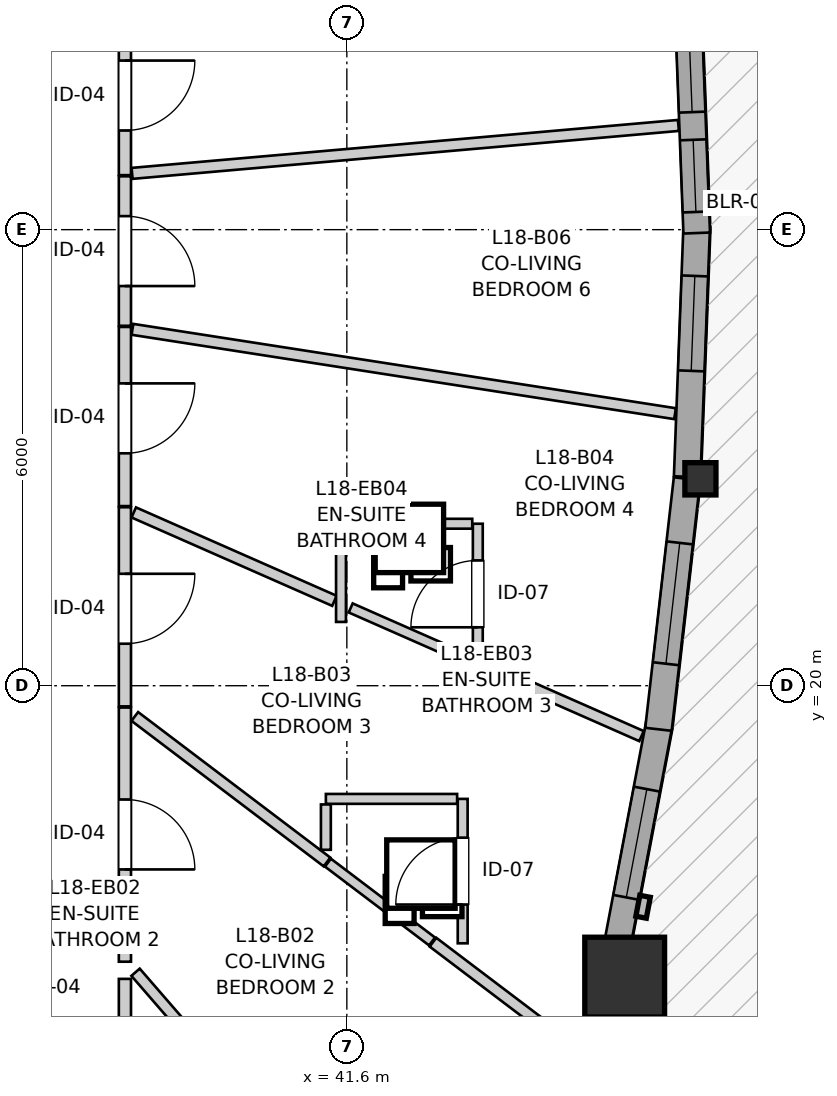
"""IFC4 building model, lengths in metres.
Left out: names, types, materials, properties, quantities, classifications, styles, units other than length and angle.
Written with IfcOpenShell. Run it as: python <this file> out.ifc"""

import sys

from ifc_helpers import new_model, si_unit, direction, frame, frame_2d, origin, origin_2d, place, context, subcontext, project, spatial, rectangle, i_section, extrude, source, transform, mapped, element, fill, save


model = new_model("IFC4")
c1 = context("Model", 3, precision=1e-05, world=origin(), true_north=direction((0.0, 1.0)))
c2 = subcontext(c1, "Body", "Model", "MODEL_VIEW")
j1 = project(units=[si_unit("LENGTHUNIT", "METRE"), si_unit("PLANEANGLEUNIT", "RADIAN")], contexts=[c1])
p1 = place(None, origin())
s1 = spatial("IfcSite", under=j1, at=p1, CompositionType="ELEMENT")
p2 = place(p1, origin())
s2 = spatial("IfcBuilding", under=s1, at=p2, CompositionType="ELEMENT")
p3 = place(p2, frame((0.0, 0.0, 62.2)))
s3 = spatial("IfcBuildingStorey", under=s2, at=p3, CompositionType="ELEMENT", Elevation=62.2)
m1 = source(origin(), c2, "Body", "SweptSolid", [
    extrude(rectangle(XDim=1.05, YDim=1.05, at=origin_2d()), origin(), (0.0, 0.0, 1.0), 2.9),
])
p4 = place(p3, frame((45.256, 16.166, 0.0), z_axis=(0.0, 0.0, 1.0), x_axis=(1.0, 0.0, 0.0)))
e1 = element("IfcColumn", 1, at=p4, inside=s3, PredefinedType="COLUMN", context=c2, shape_type="MappedRepresentation", body=[
    mapped(m1, transform((0.0, 0.0, 0.0), x_axis=(1.0, 0.0, 0.0), y_axis=(0.0, 1.0, 0.0), z_axis=(0.0, 0.0, 1.0), scale=1.0)),
])
m2 = source(origin(), c2, "Body", "SweptSolid", [
    extrude(i_section(OverallWidth=0.409, OverallDepth=0.425, WebThickness=0.03, FlangeThickness=0.048, FilletRadius=0.015, at=origin_2d()), origin(), (0.0, 0.0, 1.0), 2.9),
])
p5 = place(p3, frame((46.252, 22.722, 0.0), z_axis=(0.0, 0.0, 1.0), x_axis=(1.0, 0.0, 0.0)))
e2 = element("IfcColumn", 2, at=p5, inside=s3, PredefinedType="PILASTER", context=c2, shape_type="MappedRepresentation", body=[
    mapped(m2, transform((0.0, 0.0, 0.0), x_axis=(1.0, 0.0, 0.0), y_axis=(0.0, 1.0, 0.0), z_axis=(0.0, 0.0, 1.0), scale=1.0)),
])
p6 = place(p3, frame((44.205, 12.897, 0.0), z_axis=(0.0, 0.0, 1.0), x_axis=(0.257099428233, 0.966384956424, 0.0)))
e3 = element("IfcWall", 3, at=p6, inside=s3, PredefinedType="SOLIDWALL", context=c2, shape_type="SweptSolid", body=[
    extrude(rectangle(XDim=3.13, YDim=0.35, at=frame_2d((1.565, 0.0))), origin(), (0.0, 0.0, 1.0), 2.38),
])
p7 = place(p6, frame((0.595, 0.0, 0.0)))
e4 = element("IfcOpeningElement", 4, at=p7, cuts=e3, PredefinedType="OPENING", context=c2, shape_type="SweptSolid", body=[
    extrude(rectangle(XDim=1.0, YDim=2.1, at=frame_2d((0.5, 1.05))), frame((0.0, 0.185, 0.0), z_axis=(0.0, -1.0, 0.0), x_axis=(1.0, 0.0, 0.0)), (0.0, 0.0, 1.0), 0.37),
])
p8 = place(p3, frame((45.14, 16.494, 0.0), z_axis=(0.0, 0.0, 1.0), x_axis=(0.186608529586, 0.982434352354, 0.0)))
e5 = element("IfcWall", 5, at=p8, inside=s3, PredefinedType="SOLIDWALL", context=c2, shape_type="SweptSolid", body=[
    extrude(rectangle(XDim=3.074, YDim=0.35, at=frame_2d((1.537, 0.0))), origin(), (0.0, 0.0, 1.0), 2.38),
])
p9 = place(p8, frame((0.734, 0.0, 0.82)))
e6 = element("IfcOpeningElement", 6, at=p9, cuts=e5, PredefinedType="OPENING", context=c2, shape_type="SweptSolid", body=[
    extrude(rectangle(XDim=1.45, YDim=1.25, at=frame_2d((0.725, 0.625))), frame((0.0, 0.185, 0.0), z_axis=(0.0, -1.0, 0.0), x_axis=(1.0, 0.0, 0.0)), (0.0, 0.0, 1.0), 0.37),
])
p10 = place(p3, frame((45.7, 19.426, 0.0), z_axis=(0.0, 0.0, 1.0), x_axis=(0.113266370988, 0.993564657787, 0.0)))
e7 = element("IfcWall", 7, at=p10, inside=s3, PredefinedType="SOLIDWALL", context=c2, shape_type="SweptSolid", body=[
    extrude(rectangle(XDim=3.317, YDim=0.35, at=frame_2d((1.659, 0.0))), origin(), (0.0, 0.0, 1.0), 2.38),
])
p11 = place(p10, frame((0.869, 0.0, 0.82)))
e8 = element("IfcOpeningElement", 8, at=p11, cuts=e7, PredefinedType="OPENING", context=c2, shape_type="SweptSolid", body=[
    extrude(rectangle(XDim=1.6, YDim=1.35, at=frame_2d((0.8, 0.675))), frame((0.0, 0.185, 0.0), z_axis=(0.0, -1.0, 0.0), x_axis=(1.0, 0.0, 0.0)), (0.0, 0.0, 1.0), 0.37),
])
p12 = place(p3, frame((46.078, 22.749, 0.0), z_axis=(0.0, 0.0, 1.0), x_axis=(0.037972593677, 0.999278780986, 0.0)))
e9 = element("IfcWall", 9, at=p12, inside=s3, PredefinedType="SOLIDWALL", context=c2, shape_type="SweptSolid", body=[
    extrude(rectangle(XDim=3.298, YDim=0.35, at=frame_2d((1.649, 0.0))), origin(), (0.0, 0.0, 1.0), 2.38),
])
p13 = place(p12, frame((1.394, 0.0, 0.82)))
e10 = element("IfcOpeningElement", 10, at=p13, cuts=e9, PredefinedType="OPENING", context=c2, shape_type="SweptSolid", body=[
    extrude(rectangle(XDim=1.25, YDim=1.35, at=frame_2d((0.625, 0.675))), frame((0.0, 0.185, 0.0), z_axis=(0.0, -1.0, 0.0), x_axis=(1.0, 0.0, 0.0)), (0.0, 0.0, 1.0), 0.37),
])
p14 = place(p3, frame((46.203, 25.955, 0.0), z_axis=(0.0, 0.0, 1.0), x_axis=(-0.038016855762, 0.999277098045, 0.0)))
e11 = element("IfcWall", 11, at=p14, inside=s3, PredefinedType="SOLIDWALL", context=c2, shape_type="SweptSolid", body=[
    extrude(rectangle(XDim=3.018, YDim=0.35, at=frame_2d((1.509, 0.0))), origin(), (0.0, 0.0, 1.0), 2.38),
])
p15 = place(p14, frame((0.277, 0.0, 0.82)))
e12 = element("IfcOpeningElement", 12, at=p15, cuts=e11, PredefinedType="OPENING", context=c2, shape_type="SweptSolid", body=[
    extrude(rectangle(XDim=0.95, YDim=1.35, at=frame_2d((0.475, 0.675))), frame((0.0, 0.185, 0.0), z_axis=(0.0, -1.0, 0.0), x_axis=(1.0, 0.0, 0.0)), (0.0, 0.0, 1.0), 0.37),
])
p16 = place(p14, frame((1.592, 0.0, 0.82)))
e13 = element("IfcOpeningElement", 13, at=p16, cuts=e11, PredefinedType="OPENING", context=c2, shape_type="SweptSolid", body=[
    extrude(rectangle(XDim=0.95, YDim=1.35, at=frame_2d((0.475, 0.675))), frame((0.0, 0.185, 0.0), z_axis=(0.0, -1.0, 0.0), x_axis=(1.0, 0.0, 0.0)), (0.0, 0.0, 1.0), 0.37),
])
p17 = place(p3, frame((38.68, 19.713, 0.0), z_axis=(0.0, 0.0, 1.0), x_axis=(0.0, -1.0, 0.0)))
e14 = element("IfcWall", 14, at=p17, inside=s3, PredefinedType="PARTITIONING", context=c2, shape_type="SweptSolid", body=[
    extrude(rectangle(XDim=3.344, YDim=0.16, at=frame_2d((1.672, 0.0))), origin(), (0.0, 0.0, 1.0), 2.9),
])
p18 = place(p17, frame((1.21, 0.0, 0.0)))
e15 = element("IfcOpeningElement", 15, at=p18, cuts=e14, PredefinedType="OPENING", context=c2, shape_type="SweptSolid", body=[
    extrude(rectangle(XDim=0.92, YDim=2.1, at=frame_2d((0.46, 1.05))), frame((0.0, 0.09, 0.0), z_axis=(0.0, -1.0, 0.0), x_axis=(1.0, 0.0, 0.0)), (0.0, 0.0, 1.0), 0.18),
])
p19 = place(p3, frame((38.68, 22.348, 0.0), z_axis=(0.0, 0.0, 1.0), x_axis=(0.0, -1.0, 0.0)))
e16 = element("IfcWall", 16, at=p19, inside=s3, PredefinedType="PARTITIONING", context=c2, shape_type="SweptSolid", body=[
    extrude(rectangle(XDim=2.62, YDim=0.16, at=frame_2d((1.31, 0.0))), origin(), (0.0, 0.0, 1.0), 2.9),
])
p20 = place(p19, frame((0.875, 0.0, 0.0)))
e17 = element("IfcOpeningElement", 17, at=p20, cuts=e16, PredefinedType="OPENING", context=c2, shape_type="SweptSolid", body=[
    extrude(rectangle(XDim=0.92, YDim=2.1, at=frame_2d((0.46, 1.05))), frame((0.0, 0.09, 0.0), z_axis=(0.0, -1.0, 0.0), x_axis=(1.0, 0.0, 0.0)), (0.0, 0.0, 1.0), 0.18),
])
p21 = place(p3, frame((38.68, 24.72, 0.0), z_axis=(0.0, 0.0, 1.0), x_axis=(0.0, -1.0, 0.0)))
e18 = element("IfcWall", 18, at=p21, inside=s3, PredefinedType="PARTITIONING", context=c2, shape_type="SweptSolid", body=[
    extrude(rectangle(XDim=2.357, YDim=0.16, at=frame_2d((1.178, 0.0))), origin(), (0.0, 0.0, 1.0), 2.9),
])
p22 = place(p21, frame((0.742, 0.0, 0.0)))
e19 = element("IfcOpeningElement", 19, at=p22, cuts=e18, PredefinedType="OPENING", context=c2, shape_type="SweptSolid", body=[
    extrude(rectangle(XDim=0.92, YDim=2.1, at=frame_2d((0.46, 1.05))), frame((0.0, 0.09, 0.0), z_axis=(0.0, -1.0, 0.0), x_axis=(1.0, 0.0, 0.0)), (0.0, 0.0, 1.0), 0.18),
])
p23 = place(p3, frame((38.68, 28.766, 0.0), z_axis=(0.0, 0.0, 1.0), x_axis=(0.0, -1.0, 0.0)))
e20 = element("IfcWall", 20, at=p23, inside=s3, PredefinedType="PARTITIONING", context=c2, shape_type="SweptSolid", body=[
    extrude(rectangle(XDim=2.049, YDim=0.16, at=frame_2d((1.024, 0.0))), origin(), (0.0, 0.0, 1.0), 2.9),
])
p24 = place(p23, frame((0.542, 0.0, 0.0)))
e21 = element("IfcOpeningElement", 21, at=p24, cuts=e20, PredefinedType="OPENING", context=c2, shape_type="SweptSolid", body=[
    extrude(rectangle(XDim=0.92, YDim=2.1, at=frame_2d((0.46, 1.05))), frame((0.0, 0.09, 0.0), z_axis=(0.0, -1.0, 0.0), x_axis=(1.0, 0.0, 0.0)), (0.0, 0.0, 1.0), 0.18),
])
p25 = place(p3, frame((38.68, 26.702, 0.0), z_axis=(0.0, 0.0, 1.0), x_axis=(0.0, -1.0, 0.0)))
e22 = element("IfcWall", 22, at=p25, inside=s3, PredefinedType="PARTITIONING", context=c2, shape_type="SweptSolid", body=[
    extrude(rectangle(XDim=1.967, YDim=0.16, at=frame_2d((0.983, 0.0))), origin(), (0.0, 0.0, 1.0), 2.9),
])
p26 = place(p25, frame((0.524, 0.0, 0.0)))
e23 = element("IfcOpeningElement", 23, at=p26, cuts=e22, PredefinedType="OPENING", context=c2, shape_type="SweptSolid", body=[
    extrude(rectangle(XDim=0.92, YDim=2.1, at=frame_2d((0.46, 1.05))), frame((0.0, 0.09, 0.0), z_axis=(0.0, -1.0, 0.0), x_axis=(1.0, 0.0, 0.0)), (0.0, 0.0, 1.0), 0.18),
])
p27 = place(p3, frame((43.124, 16.611, 0.0), z_axis=(0.0, 0.0, 1.0), x_axis=(0.0, 1.0, 0.0)))
e24 = element("IfcWall", 24, at=p27, inside=s3, PredefinedType="PARTITIONING", context=c2, shape_type="SweptSolid", body=[
    extrude(rectangle(XDim=1.9, YDim=0.13, at=frame_2d((0.95, 0.0))), origin(), (0.0, 0.0, 1.0), 2.9),
])
p28 = place(p27, frame((0.51, 0.0, 0.0)))
e25 = element("IfcOpeningElement", 25, at=p28, cuts=e24, PredefinedType="OPENING", context=c2, shape_type="SweptSolid", body=[
    extrude(rectangle(XDim=0.88, YDim=2.05, at=frame_2d((0.44, 1.025))), frame((0.0, 0.075, 0.0), z_axis=(0.0, -1.0, 0.0), x_axis=(1.0, 0.0, 0.0)), (0.0, 0.0, 1.0), 0.15),
])
p29 = place(p3, frame((43.323, 20.286, 0.0), z_axis=(0.0, 0.0, 1.0), x_axis=(0.0, 1.0, 0.0)))
e26 = element("IfcWall", 26, at=p29, inside=s3, PredefinedType="PARTITIONING", context=c2, shape_type="SweptSolid", body=[
    extrude(rectangle(XDim=1.845, YDim=0.13, at=frame_2d((0.923, 0.0))), origin(), (0.0, 0.0, 1.0), 2.9),
])
p30 = place(p29, frame((0.482, 0.0, 0.0)))
e27 = element("IfcOpeningElement", 27, at=p30, cuts=e26, PredefinedType="OPENING", context=c2, shape_type="SweptSolid", body=[
    extrude(rectangle(XDim=0.88, YDim=2.05, at=frame_2d((0.44, 1.025))), frame((0.0, 0.075, 0.0), z_axis=(0.0, -1.0, 0.0), x_axis=(1.0, 0.0, 0.0)), (0.0, 0.0, 1.0), 0.15),
])
p31 = place(p3, frame((38.779, 24.689, 0.0), z_axis=(0.0, 0.0, 1.0), x_axis=(0.988134938683, -0.153588225311, 0.0)))
e28 = element("IfcWall", 28, at=p31, inside=s3, PredefinedType="PARTITIONING", context=c2, shape_type="SweptSolid", body=[
    extrude(rectangle(XDim=7.225, YDim=0.145, at=frame_2d((3.612, 0.0))), origin(), (0.0, 0.0, 1.0), 2.9),
])
p32 = place(p3, frame((38.774, 26.74, 0.0), z_axis=(0.0, 0.0, 1.0), x_axis=(0.99617095107, 0.087426747871, 0.0)))
e29 = element("IfcWall", 29, at=p32, inside=s3, PredefinedType="PARTITIONING", context=c2, shape_type="SweptSolid", body=[
    extrude(rectangle(XDim=7.216, YDim=0.145, at=frame_2d((3.608, 0.0))), origin(), (0.0, 0.0, 1.0), 2.9),
])
p33 = place(p3, frame((38.81, 19.595, 0.0), z_axis=(0.0, 0.0, 1.0), x_axis=(0.797304275437, -0.603577577756, 0.0)))
e30 = element("IfcWall", 30, at=p33, inside=s3, PredefinedType="PARTITIONING", context=c2, shape_type="SweptSolid", body=[
    extrude(rectangle(XDim=3.172, YDim=0.145, at=frame_2d((1.586, 0.0))), origin(), (0.0, 0.0, 1.0), 2.9),
])
p34 = place(p3, frame((38.796, 22.28, 0.0), z_axis=(0.0, 0.0, 1.0), x_axis=(0.9151327572, -0.403152622092, 0.0)))
e31 = element("IfcWall", 31, at=p34, inside=s3, PredefinedType="PARTITIONING", context=c2, shape_type="SweptSolid", body=[
    extrude(rectangle(XDim=2.885, YDim=0.145, at=frame_2d((1.442, 0.0))), origin(), (0.0, 0.0, 1.0), 2.9),
])
p35 = place(p3, frame((38.82, 16.23, 0.0), z_axis=(0.0, 0.0, 1.0), x_axis=(0.655037088123, -0.755596726556, 0.0)))
e32 = element("IfcWall", 32, at=p35, inside=s3, PredefinedType="PARTITIONING", context=c2, shape_type="SweptSolid", body=[
    extrude(rectangle(XDim=2.442, YDim=0.145, at=frame_2d((1.221, 0.0))), origin(), (0.0, 0.0, 1.0), 2.9),
])
p36 = place(p3, frame((43.41, 20.248, 0.0), z_axis=(0.0, 0.0, 1.0), x_axis=(0.915032786041, -0.403379474527, 0.0)))
e33 = element("IfcWall", 33, at=p36, inside=s3, PredefinedType="PARTITIONING", context=c2, shape_type="SweptSolid", body=[
    extrude(rectangle(XDim=2.259, YDim=0.145, at=frame_2d((1.13, 0.0))), origin(), (0.0, 0.0, 1.0), 2.9),
])
p37 = place(p3, frame((42.733, 16.626, 0.0), z_axis=(0.0, 0.0, 1.0), x_axis=(0.797372907097, -0.603486907089, 0.0)))
e34 = element("IfcWall", 34, at=p37, inside=s3, PredefinedType="PARTITIONING", context=c2, shape_type="SweptSolid", body=[
    extrude(rectangle(XDim=2.371, YDim=0.145, at=frame_2d((1.186, 0.0))), origin(), (0.0, 0.0, 1.0), 2.9),
])
p38 = place(p3, frame((41.65, 21.023, 0.0), z_axis=(0.0, 0.0, 1.0), x_axis=(0.915165742406, -0.403077739309, 0.0)))
e35 = element("IfcWall", 35, at=p38, inside=s3, PredefinedType="PARTITIONING", context=c2, shape_type="SweptSolid", body=[
    extrude(rectangle(XDim=1.689, YDim=0.13, at=frame_2d((0.844, 0.0))), origin(), (0.0, 0.0, 1.0), 2.9),
])
p39 = place(p3, frame((41.324, 18.511, 0.0), z_axis=(0.0, 0.0, 1.0), x_axis=(1.0, 0.0, 0.0)))
e36 = element("IfcWall", 36, at=p39, inside=s3, PredefinedType="PARTITIONING", context=c2, shape_type="SweptSolid", body=[
    extrude(rectangle(XDim=1.727, YDim=0.13, at=frame_2d((0.864, 0.0))), origin(), (0.0, 0.0, 1.0), 2.9),
])
p40 = place(p3, frame((41.596, 22.131, 0.0), z_axis=(0.0, 0.0, 1.0), x_axis=(1.0, 0.0, 0.0)))
e37 = element("IfcWall", 37, at=p40, inside=s3, PredefinedType="PARTITIONING", context=c2, shape_type="SweptSolid", body=[
    extrude(rectangle(XDim=1.654, YDim=0.13, at=frame_2d((0.827, 0.0))), origin(), (0.0, 0.0, 1.0), 2.9),
])
p41 = place(p3, frame((41.351, 17.672, 0.0), z_axis=(0.0, 0.0, 1.0), x_axis=(0.797400841938, -0.603449995672, 0.0)))
e38 = element("IfcWall", 38, at=p41, inside=s3, PredefinedType="PARTITIONING", context=c2, shape_type="SweptSolid", body=[
    extrude(rectangle(XDim=1.718, YDim=0.13, at=frame_2d((0.859, 0.0))), origin(), (0.0, 0.0, 1.0), 2.9),
])
p42 = place(p3, frame((41.523, 20.839, 0.0), z_axis=(0.0, 0.0, 1.0), x_axis=(0.0, 1.0, 0.0)))
e39 = element("IfcWall", 39, at=p42, inside=s3, PredefinedType="PARTITIONING", context=c2, shape_type="SweptSolid", body=[
    extrude(rectangle(XDim=1.532, YDim=0.13, at=frame_2d((0.766, 0.0))), origin(), (0.0, 0.0, 1.0), 2.9),
])
p43 = place(p3, frame((38.68, 15.508, 0.0), z_axis=(0.0, 0.0, 1.0), x_axis=(0.0, 1.0, 0.0)))
e40 = element("IfcWall", 40, at=p43, inside=s3, PredefinedType="PARTITIONING", context=c2, shape_type="SweptSolid", body=[
    extrude(rectangle(XDim=0.635, YDim=0.16, at=frame_2d((0.317, 0.0))), origin(), (0.0, 0.0, 1.0), 2.9),
])
p44 = place(p3, frame((41.324, 17.841, 0.0), z_axis=(0.0, 0.0, 1.0), x_axis=(0.0, 1.0, 0.0)))
e41 = element("IfcWall", 41, at=p44, inside=s3, PredefinedType="PARTITIONING", context=c2, shape_type="SweptSolid", body=[
    extrude(rectangle(XDim=0.597, YDim=0.13, at=frame_2d((0.298, 0.0))), origin(), (0.0, 0.0, 1.0), 2.9),
])
m3 = source(origin(), c2, "Body", "SweptSolid", [
    extrude(rectangle(XDim=1.45, YDim=1.25, at=frame_2d((0.725, 0.625))), frame((0.0, 0.03, 0.0), z_axis=(0.0, -1.0, 0.0), x_axis=(1.0, 0.0, 0.0)), (0.0, 0.0, 1.0), 0.06),
])
p45 = place(p9, origin())
e42 = element("IfcWindow", 42, at=p45, inside=s3, PartitioningType="SINGLE_PANEL", PredefinedType="WINDOW", context=c2, shape_type="MappedRepresentation", body=[
    mapped(m3, transform((0.0, 0.0, 0.0), x_axis=(1.0, 0.0, 0.0), y_axis=(0.0, 1.0, 0.0), z_axis=(0.0, 0.0, 1.0), scale=1.0)),
])
fill(e6, e42)
m4 = source(origin(), c2, "Body", "SweptSolid", [
    extrude(rectangle(XDim=1.6, YDim=1.35, at=frame_2d((0.8, 0.675))), frame((0.0, 0.03, 0.0), z_axis=(0.0, -1.0, 0.0), x_axis=(1.0, 0.0, 0.0)), (0.0, 0.0, 1.0), 0.06),
])
p46 = place(p11, origin())
e43 = element("IfcWindow", 43, at=p46, inside=s3, PartitioningType="SINGLE_PANEL", PredefinedType="WINDOW", context=c2, shape_type="MappedRepresentation", body=[
    mapped(m4, transform((0.0, 0.0, 0.0), x_axis=(1.0, 0.0, 0.0), y_axis=(0.0, 1.0, 0.0), z_axis=(0.0, 0.0, 1.0), scale=1.0)),
])
fill(e8, e43)
m5 = source(origin(), c2, "Body", "SweptSolid", [
    extrude(rectangle(XDim=1.25, YDim=1.35, at=frame_2d((0.625, 0.675))), frame((0.0, 0.03, 0.0), z_axis=(0.0, -1.0, 0.0), x_axis=(1.0, 0.0, 0.0)), (0.0, 0.0, 1.0), 0.06),
])
p47 = place(p13, origin())
e44 = element("IfcWindow", 44, at=p47, inside=s3, PartitioningType="SINGLE_PANEL", PredefinedType="WINDOW", context=c2, shape_type="MappedRepresentation", body=[
    mapped(m5, transform((0.0, 0.0, 0.0), x_axis=(1.0, 0.0, 0.0), y_axis=(0.0, 1.0, 0.0), z_axis=(0.0, 0.0, 1.0), scale=1.0)),
])
fill(e10, e44)
m6 = source(origin(), c2, "Body", "SweptSolid", [
    extrude(rectangle(XDim=0.95, YDim=1.35, at=frame_2d((0.475, 0.675))), frame((0.0, 0.03, 0.0), z_axis=(0.0, -1.0, 0.0), x_axis=(1.0, 0.0, 0.0)), (0.0, 0.0, 1.0), 0.06),
])
p48 = place(p15, origin())
e45 = element("IfcWindow", 45, at=p48, inside=s3, PartitioningType="SINGLE_PANEL", PredefinedType="WINDOW", context=c2, shape_type="MappedRepresentation", body=[
    mapped(m6, transform((0.0, 0.0, 0.0), x_axis=(1.0, 0.0, 0.0), y_axis=(0.0, 1.0, 0.0), z_axis=(0.0, 0.0, 1.0), scale=1.0)),
])
fill(e12, e45)
p49 = place(p16, origin())
e46 = element("IfcWindow", 46, at=p49, inside=s3, PartitioningType="SINGLE_PANEL", PredefinedType="WINDOW", context=c2, shape_type="MappedRepresentation", body=[
    mapped(m6, transform((0.0, 0.0, 0.0), x_axis=(1.0, 0.0, 0.0), y_axis=(0.0, 1.0, 0.0), z_axis=(0.0, 0.0, 1.0), scale=1.0)),
])
fill(e13, e46)
m7 = source(origin(), c2, "Body", "SweptSolid", [
    extrude(rectangle(XDim=0.92, YDim=2.1, at=frame_2d((0.46, 1.05))), frame((0.0, 0.025, 0.0), z_axis=(0.0, -1.0, 0.0), x_axis=(1.0, 0.0, 0.0)), (0.0, 0.0, 1.0), 0.05),
])
p50 = place(p18, origin())
e47 = element("IfcDoor", 47, at=p50, inside=s3, OperationType="SINGLE_SWING_RIGHT", PredefinedType="DOOR", context=c2, shape_type="MappedRepresentation", body=[
    mapped(m7, transform((0.0, 0.0, 0.0), x_axis=(1.0, 0.0, 0.0), y_axis=(0.0, 1.0, 0.0), z_axis=(0.0, 0.0, 1.0), scale=1.0)),
])
fill(e15, e47)
p51 = place(p20, origin())
e48 = element("IfcDoor", 48, at=p51, inside=s3, OperationType="SINGLE_SWING_LEFT", PredefinedType="DOOR", context=c2, shape_type="MappedRepresentation", body=[
    mapped(m7, transform((0.0, 0.0, 0.0), x_axis=(1.0, 0.0, 0.0), y_axis=(0.0, 1.0, 0.0), z_axis=(0.0, 0.0, 1.0), scale=1.0)),
])
fill(e17, e48)
p52 = place(p22, origin())
e49 = element("IfcDoor", 49, at=p52, inside=s3, OperationType="SINGLE_SWING_LEFT", PredefinedType="DOOR", context=c2, shape_type="MappedRepresentation", body=[
    mapped(m7, transform((0.0, 0.0, 0.0), x_axis=(1.0, 0.0, 0.0), y_axis=(0.0, 1.0, 0.0), z_axis=(0.0, 0.0, 1.0), scale=1.0)),
])
fill(e19, e49)
p53 = place(p24, origin())
e50 = element("IfcDoor", 50, at=p53, inside=s3, OperationType="SINGLE_SWING_LEFT", PredefinedType="DOOR", context=c2, shape_type="MappedRepresentation", body=[
    mapped(m7, transform((0.0, 0.0, 0.0), x_axis=(1.0, 0.0, 0.0), y_axis=(0.0, 1.0, 0.0), z_axis=(0.0, 0.0, 1.0), scale=1.0)),
])
fill(e21, e50)
p54 = place(p26, origin())
e51 = element("IfcDoor", 51, at=p54, inside=s3, OperationType="SINGLE_SWING_RIGHT", PredefinedType="DOOR", context=c2, shape_type="MappedRepresentation", body=[
    mapped(m7, transform((0.0, 0.0, 0.0), x_axis=(1.0, 0.0, 0.0), y_axis=(0.0, 1.0, 0.0), z_axis=(0.0, 0.0, 1.0), scale=1.0)),
])
fill(e23, e51)
m8 = source(origin(), c2, "Body", "SweptSolid", [
    extrude(rectangle(XDim=0.88, YDim=2.05, at=frame_2d((0.44, 1.025))), frame((0.0, 0.025, 0.0), z_axis=(0.0, -1.0, 0.0), x_axis=(1.0, 0.0, 0.0)), (0.0, 0.0, 1.0), 0.05),
])
p55 = place(p28, origin())
e52 = element("IfcDoor", 52, at=p55, inside=s3, OperationType="SINGLE_SWING_LEFT", PredefinedType="DOOR", context=c2, shape_type="MappedRepresentation", body=[
    mapped(m8, transform((0.0, 0.0, 0.0), x_axis=(1.0, 0.0, 0.0), y_axis=(0.0, 1.0, 0.0), z_axis=(0.0, 0.0, 1.0), scale=1.0)),
])
fill(e25, e52)
p56 = place(p30, origin())
e53 = element("IfcDoor", 53, at=p56, inside=s3, OperationType="SINGLE_SWING_LEFT", PredefinedType="DOOR", context=c2, shape_type="MappedRepresentation", body=[
    mapped(m8, transform((0.0, 0.0, 0.0), x_axis=(1.0, 0.0, 0.0), y_axis=(0.0, 1.0, 0.0), z_axis=(0.0, 0.0, 1.0), scale=1.0)),
])
fill(e27, e53)
save(model, sys.argv[1])
